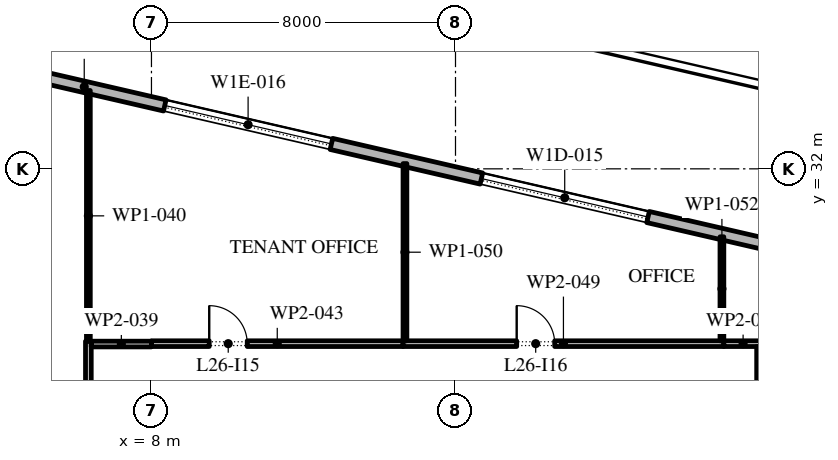
"""IFC4 building model, lengths in metres.
Left out: names, types, materials, properties, quantities, classifications, styles, units other than length and angle.
Written with IfcOpenShell. Run it as: python <this file> out.ifc"""

import sys

from ifc_helpers import new_model, si_unit, direction, frame, frame_2d, origin, place, context, subcontext, project, spatial, rectangle, extrude, element, fill, save


model = new_model("IFC4")
c1 = context("Model", 3, precision=1e-05, world=origin(), true_north=direction((0.0, 1.0)))
c2 = subcontext(c1, "Body", "Model", "MODEL_VIEW")
j1 = project(units=[si_unit("LENGTHUNIT", "METRE"), si_unit("PLANEANGLEUNIT", "RADIAN")], contexts=[c1])
p1 = place(None, origin())
s1 = spatial("IfcSite", under=j1, at=p1, CompositionType="ELEMENT")
p2 = place(p1, origin())
s2 = spatial("IfcBuilding", under=s1, at=p2, CompositionType="ELEMENT")
p3 = place(p2, frame((0.0, 0.0, 122.4)))
s3 = spatial("IfcBuildingStorey", under=s2, at=p3, CompositionType="ELEMENT", Elevation=122.4)
p4 = place(p3, frame((31.078, 28.421, 0.0), z_axis=(0.0, 0.0, 1.0), x_axis=(-0.974370456532, 0.224949357493, 0.0)))
e1 = element("IfcWall", 1, at=p4, inside=s3, PredefinedType="STANDARD", context=c2, shape_type="SweptSolid", body=[
    extrude(rectangle(XDim=51.0, YDim=0.3, at=frame_2d((25.5, 0.0))), origin(), (0.0, 0.0, 1.0), 4.0),
])
p5 = place(p4, frame((1.875, 0.0, 0.45)))
e2 = element("IfcOpeningElement", 2, at=p5, cuts=e1, PredefinedType="OPENING", context=c2, shape_type="SweptSolid", body=[
    extrude(rectangle(XDim=4.5, YDim=2.95, at=frame_2d((2.25, 1.475))), frame((0.0, 0.16, 0.0), z_axis=(0.0, -1.0, 0.0), x_axis=(1.0, 0.0, 0.0)), (0.0, 0.0, 1.0), 0.32),
])
p6 = place(p4, frame((10.275, 0.0, 0.45)))
e3 = element("IfcOpeningElement", 3, at=p6, cuts=e1, PredefinedType="OPENING", context=c2, shape_type="SweptSolid", body=[
    extrude(rectangle(XDim=4.5, YDim=2.875, at=frame_2d((2.25, 1.438))), frame((0.0, 0.16, 0.0), z_axis=(0.0, -1.0, 0.0), x_axis=(1.0, 0.0, 0.0)), (0.0, 0.0, 1.0), 0.32),
])
p7 = place(p4, frame((18.825, 0.0, 0.45)))
e4 = element("IfcOpeningElement", 4, at=p7, cuts=e1, PredefinedType="OPENING", context=c2, shape_type="SweptSolid", body=[
    extrude(rectangle(XDim=4.5, YDim=2.825, at=frame_2d((2.25, 1.413))), frame((0.0, 0.16, 0.0), z_axis=(0.0, -1.0, 0.0), x_axis=(1.0, 0.0, 0.0)), (0.0, 0.0, 1.0), 0.32),
])
p8 = place(p4, frame((27.075, 0.0, 0.0)))
e5 = element("IfcOpeningElement", 5, at=p8, cuts=e1, PredefinedType="OPENING", context=c2, shape_type="SweptSolid", body=[
    extrude(rectangle(XDim=2.4, YDim=3.125, at=frame_2d((1.2, 1.562))), frame((0.0, 0.16, 0.0), z_axis=(0.0, -1.0, 0.0), x_axis=(1.0, 0.0, 0.0)), (0.0, 0.0, 1.0), 0.32),
])
p9 = place(p4, frame((35.925, 0.0, 0.45)))
e6 = element("IfcOpeningElement", 6, at=p9, cuts=e1, PredefinedType="OPENING", context=c2, shape_type="SweptSolid", body=[
    extrude(rectangle(XDim=4.5, YDim=2.575, at=frame_2d((2.25, 1.288))), frame((0.0, 0.16, 0.0), z_axis=(0.0, -1.0, 0.0), x_axis=(1.0, 0.0, 0.0)), (0.0, 0.0, 1.0), 0.32),
])
p10 = place(p4, frame((44.475, 0.0, 0.45)))
e7 = element("IfcOpeningElement", 7, at=p10, cuts=e1, PredefinedType="OPENING", context=c2, shape_type="SweptSolid", body=[
    extrude(rectangle(XDim=4.5, YDim=3.05, at=frame_2d((2.25, 1.525))), frame((0.0, 0.16, 0.0), z_axis=(0.0, -1.0, 0.0), x_axis=(1.0, 0.0, 0.0)), (0.0, 0.0, 1.0), 0.32),
])
p11 = place(p3, frame((6.34, 19.075, 0.0), z_axis=(0.0, 0.0, 1.0), x_axis=(0.0, 1.0, 0.0)))
e8 = element("IfcWall", 8, at=p11, inside=s3, PredefinedType="PARTITIONING", context=c2, shape_type="SweptSolid", body=[
    extrude(rectangle(XDim=8.39, YDim=0.15, at=frame_2d((4.195, 0.0))), origin(), (0.0, 0.0, 1.0), 4.0),
])
p12 = place(p11, frame((3.665, 0.0, 0.0)))
e9 = element("IfcOpeningElement", 9, at=p12, cuts=e8, PredefinedType="OPENING", context=c2, shape_type="SweptSolid", body=[
    extrude(rectangle(XDim=1.0, YDim=2.1, at=frame_2d((0.5, 1.05))), frame((0.0, 0.085, 0.0), z_axis=(0.0, -1.0, 0.0), x_axis=(1.0, 0.0, 0.0)), (0.0, 0.0, 1.0), 0.17),
])
p13 = place(p3, frame((6.415, 27.39, 0.0), z_axis=(0.0, 0.0, 1.0), x_axis=(1.0, 0.0, 0.0)))
e10 = element("IfcWall", 10, at=p13, inside=s3, PredefinedType="PARTITIONING", context=c2, shape_type="SweptSolid", body=[
    extrude(rectangle(XDim=1.585, YDim=0.15, at=frame_2d((0.792, 0.0))), origin(), (0.0, 0.0, 1.0), 4.0),
])
p14 = place(p3, frame((6.34, 34.061, 0.0), z_axis=(0.0, 0.0, 1.0), x_axis=(0.0, -1.0, 0.0)))
e11 = element("IfcWall", 11, at=p14, inside=s3, PredefinedType="PARTITIONING", context=c2, shape_type="SweptSolid", body=[
    extrude(rectangle(XDim=6.596, YDim=0.1, at=frame_2d((3.298, 0.0))), origin(), (0.0, 0.0, 1.0), 4.0),
])
p15 = place(p3, frame((8.0, 27.4, 0.0), z_axis=(0.0, 0.0, 1.0), x_axis=(1.0, 0.0, 0.0)))
e12 = element("IfcWall", 12, at=p15, inside=s3, PredefinedType="PARTITIONING", context=c2, shape_type="SweptSolid", body=[
    extrude(rectangle(XDim=6.62, YDim=0.15, at=frame_2d((3.31, 0.0))), origin(), (0.0, 0.0, 1.0), 4.0),
])
p16 = place(p15, frame((1.52, 0.0, 0.0)))
e13 = element("IfcOpeningElement", 13, at=p16, cuts=e12, PredefinedType="OPENING", context=c2, shape_type="SweptSolid", body=[
    extrude(rectangle(XDim=1.0, YDim=2.1, at=frame_2d((0.5, 1.05))), frame((0.0, 0.085, 0.0), z_axis=(0.0, -1.0, 0.0), x_axis=(1.0, 0.0, 0.0)), (0.0, 0.0, 1.0), 0.17),
])
p17 = place(p3, frame((14.62, 27.4, 0.0), z_axis=(0.0, 0.0, 1.0), x_axis=(1.0, 0.0, 0.0)))
e14 = element("IfcWall", 14, at=p17, inside=s3, PredefinedType="PARTITIONING", context=c2, shape_type="SweptSolid", body=[
    extrude(rectangle(XDim=8.44, YDim=0.15, at=frame_2d((4.22, 0.0))), origin(), (0.0, 0.0, 1.0), 4.0),
])
p18 = place(p17, frame((2.99, 0.0, 0.0)))
e15 = element("IfcOpeningElement", 15, at=p18, cuts=e14, PredefinedType="OPENING", context=c2, shape_type="SweptSolid", body=[
    extrude(rectangle(XDim=1.0, YDim=2.1, at=frame_2d((0.5, 1.05))), frame((0.0, 0.085, 0.0), z_axis=(0.0, -1.0, 0.0), x_axis=(1.0, 0.0, 0.0)), (0.0, 0.0, 1.0), 0.17),
])
p19 = place(p3, frame((14.67, 32.138, 0.0), z_axis=(0.0, 0.0, 1.0), x_axis=(0.0, -1.0, 0.0)))
e16 = element("IfcWall", 16, at=p19, inside=s3, PredefinedType="PARTITIONING", context=c2, shape_type="SweptSolid", body=[
    extrude(rectangle(XDim=4.663, YDim=0.1, at=frame_2d((2.332, 0.0))), origin(), (0.0, 0.0, 1.0), 4.0),
])
p20 = place(p3, frame((23.06, 27.4, 0.0), z_axis=(0.0, 0.0, 1.0), x_axis=(1.0, 0.0, 0.0)))
e17 = element("IfcWall", 17, at=p20, inside=s3, PredefinedType="PARTITIONING", context=c2, shape_type="SweptSolid", body=[
    extrude(rectangle(XDim=1.015, YDim=0.15, at=frame_2d((0.507, 0.0))), origin(), (0.0, 0.0, 1.0), 4.0),
])
p21 = place(p3, frame((23.01, 30.212, 0.0), z_axis=(0.0, 0.0, 1.0), x_axis=(0.0, -1.0, 0.0)))
e18 = element("IfcWall", 18, at=p21, inside=s3, PredefinedType="PARTITIONING", context=c2, shape_type="SweptSolid", body=[
    extrude(rectangle(XDim=2.737, YDim=0.1, at=frame_2d((1.368, 0.0))), origin(), (0.0, 0.0, 1.0), 4.0),
])
p22 = place(p3, frame((24.0, 27.325, 0.0), z_axis=(0.0, 0.0, 1.0), x_axis=(0.0, -1.0, 0.0)))
e19 = element("IfcWall", 19, at=p22, inside=s3, PredefinedType="PARTITIONING", context=c2, shape_type="SweptSolid", body=[
    extrude(rectangle(XDim=10.845, YDim=0.15, at=frame_2d((5.422, 0.0))), origin(), (0.0, 0.0, 1.0), 4.0),
])
p23 = place(p22, frame((3.695, 0.0, 0.0)))
e20 = element("IfcOpeningElement", 20, at=p23, cuts=e19, PredefinedType="OPENING", context=c2, shape_type="SweptSolid", body=[
    extrude(rectangle(XDim=1.0, YDim=2.1, at=frame_2d((0.5, 1.05))), frame((0.0, 0.085, 0.0), z_axis=(0.0, -1.0, 0.0), x_axis=(1.0, 0.0, 0.0)), (0.0, 0.0, 1.0), 0.17),
])
p24 = place(p6, origin())
e21 = element("IfcWindow", 21, at=p24, inside=s3, PartitioningType="DOUBLE_PANEL_VERTICAL", PredefinedType="WINDOW", context=c2, shape_type="SweptSolid", body=[
    extrude(rectangle(XDim=4.5, YDim=2.875, at=frame_2d((2.25, 1.438))), frame((0.0, 0.03, 0.0), z_axis=(0.0, -1.0, 0.0), x_axis=(1.0, 0.0, 0.0)), (0.0, 0.0, 1.0), 0.06),
])
fill(e3, e21)
p25 = place(p7, origin())
e22 = element("IfcWindow", 22, at=p25, inside=s3, PartitioningType="DOUBLE_PANEL_VERTICAL", PredefinedType="WINDOW", context=c2, shape_type="SweptSolid", body=[
    extrude(rectangle(XDim=4.5, YDim=2.825, at=frame_2d((2.25, 1.413))), frame((0.0, 0.03, 0.0), z_axis=(0.0, -1.0, 0.0), x_axis=(1.0, 0.0, 0.0)), (0.0, 0.0, 1.0), 0.06),
])
fill(e4, e22)
p26 = place(p16, origin())
e23 = element("IfcDoor", 23, at=p26, inside=s3, OperationType="SINGLE_SWING_RIGHT", PredefinedType="DOOR", context=c2, shape_type="SweptSolid", body=[
    extrude(rectangle(XDim=1.0, YDim=2.1, at=frame_2d((0.5, 1.05))), frame((0.0, 0.025, 0.0), z_axis=(0.0, -1.0, 0.0), x_axis=(1.0, 0.0, 0.0)), (0.0, 0.0, 1.0), 0.05),
])
fill(e13, e23)
p27 = place(p18, origin())
e24 = element("IfcDoor", 24, at=p27, inside=s3, OperationType="SINGLE_SWING_RIGHT", PredefinedType="DOOR", context=c2, shape_type="SweptSolid", body=[
    extrude(rectangle(XDim=1.0, YDim=2.1, at=frame_2d((0.5, 1.05))), frame((0.0, 0.025, 0.0), z_axis=(0.0, -1.0, 0.0), x_axis=(1.0, 0.0, 0.0)), (0.0, 0.0, 1.0), 0.05),
])
fill(e15, e24)
save(model, sys.argv[1])
